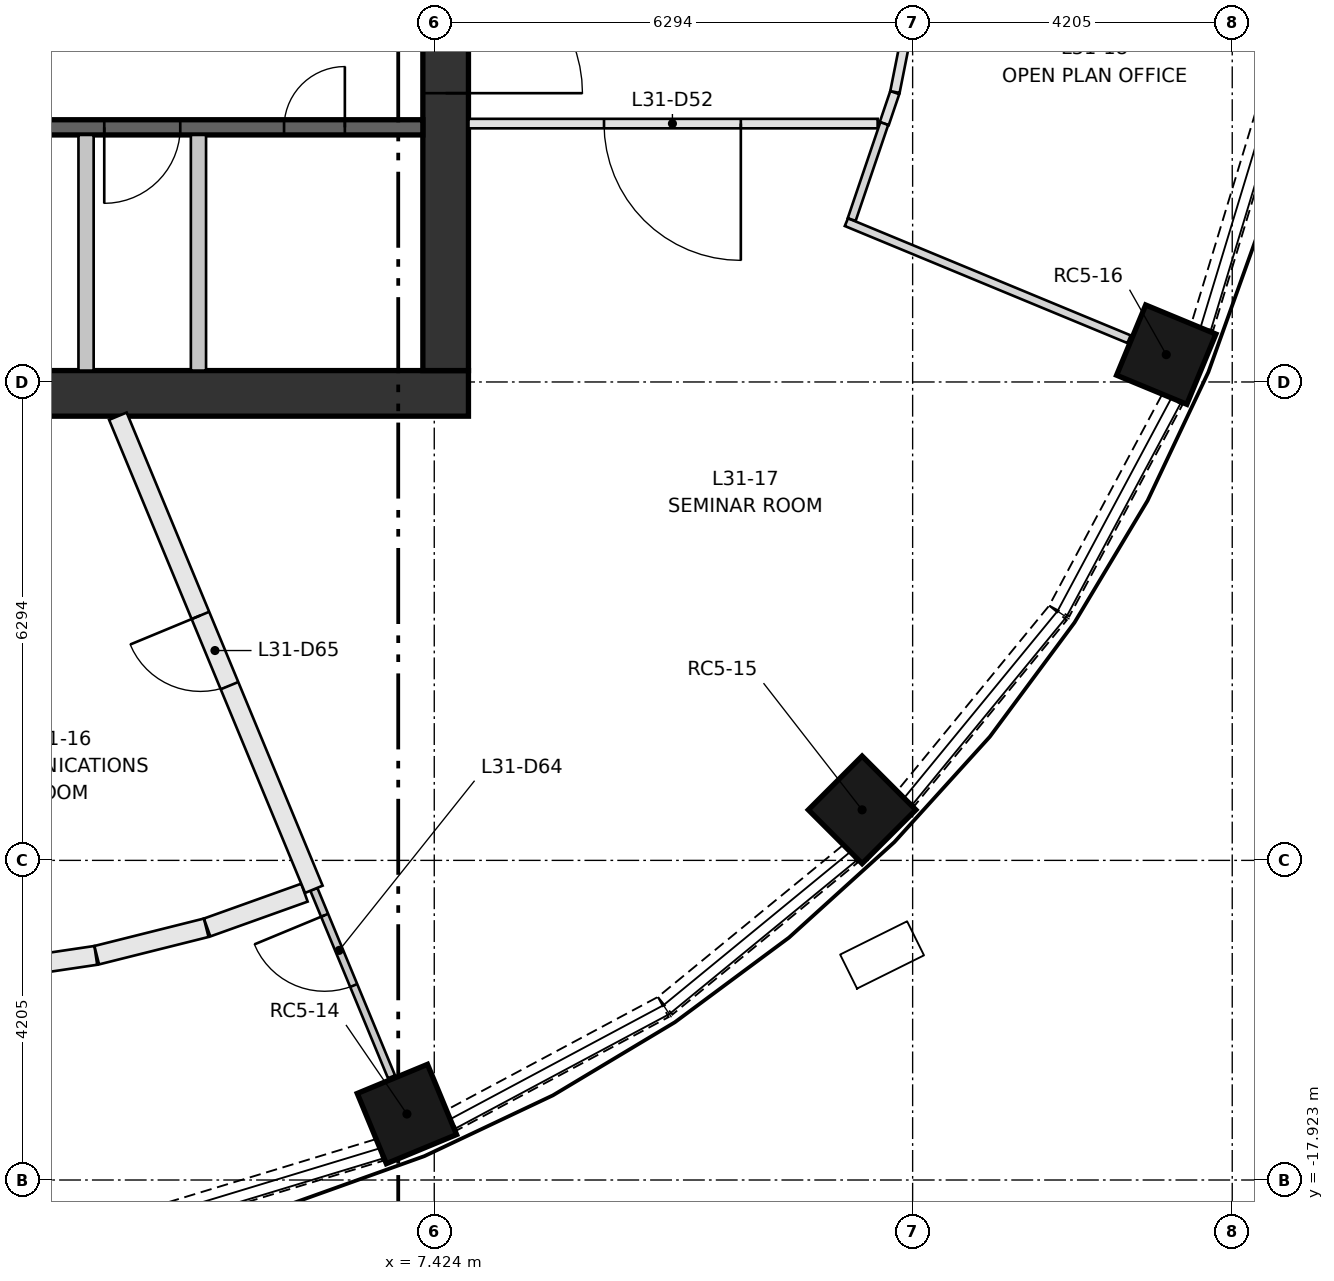
"""IFC4 building model, lengths in metres.
Left out: names, types, materials, properties, quantities, classifications, styles, units other than length and angle.
Written with IfcOpenShell. Run it as: python <this file> out.ifc"""

import sys

from ifc_helpers import new_model, si_unit, direction, frame, frame_2d, origin, origin_2d, place, context, subcontext, project, spatial, rectangle, extrude, element, fill, save


model = new_model("IFC4")
c1 = context("Model", 3, precision=1e-05, world=origin(), true_north=direction((0.0, 1.0)))
c2 = subcontext(c1, "Body", "Model", "MODEL_VIEW")
j1 = project(units=[si_unit("LENGTHUNIT", "METRE"), si_unit("PLANEANGLEUNIT", "RADIAN")], contexts=[c1])
p1 = place(None, origin())
s1 = spatial("IfcSite", under=j1, at=p1, CompositionType="ELEMENT")
p2 = place(p1, origin())
s2 = spatial("IfcBuilding", under=s1, at=p2, CompositionType="ELEMENT")
p3 = place(p2, frame((0.0, 0.0, 120.95)))
s3 = spatial("IfcBuildingStorey", under=s2, at=p3, CompositionType="ELEMENT", Elevation=120.95)
for number, where, z_axis, x_axis in (
    (1, (7.064, -17.055, 0.0), (0.0, 0.0, 1.0), (0.383, -0.924, 0.0)),
    (2, (13.053, -13.053, 0.0), (0.0, 0.0, 1.0), (0.707, -0.707, 0.0)),
    (3, (17.055, -7.064, 0.0), (0.0, 0.0, 1.0), (0.924, -0.383, 0.0)),
):
    element("IfcColumn", number, at=place(p3, frame(where, z_axis=z_axis, x_axis=x_axis)), inside=s3, PredefinedType="COLUMN", context=c2, shape_type="SweptSolid", body=[
        extrude(rectangle(XDim=1.0, YDim=1.0, at=origin_2d()), origin(), (0.0, 0.0, 1.0), 3.35),
    ])
p4 = place(p3, frame((-7.874, -7.574, 0.0), z_axis=(0.0, 0.0, 1.0), x_axis=(1.0, 0.0, 0.0)))
e4 = element("IfcWall", 4, at=p4, inside=s3, PredefinedType="SHEAR", context=c2, shape_type="SweptSolid", body=[
    extrude(rectangle(XDim=15.748, YDim=0.6, at=frame_2d((7.874, 0.0))), origin(), (0.0, 0.0, 1.0), 3.35),
])
p5 = place(p3, frame((7.574, -7.274, 0.0), z_axis=(0.0, 0.0, 1.0), x_axis=(0.0, 1.0, 0.0)))
e5 = element("IfcWall", 5, at=p5, inside=s3, PredefinedType="SHEAR", context=c2, shape_type="SweptSolid", body=[
    extrude(rectangle(XDim=14.548, YDim=0.6, at=frame_2d((7.274, 0.0))), origin(), (0.0, 0.0, 1.0), 3.35),
])
p6 = place(p5, frame((6.774, 0.0, 0.0)))
e6 = element("IfcOpeningElement", 6, at=p6, cuts=e5, PredefinedType="OPENING", context=c2, shape_type="SweptSolid", body=[
    extrude(rectangle(XDim=1.0, YDim=2.1, at=frame_2d((0.5, 1.05))), frame((0.0, 0.31, 0.0), z_axis=(0.0, -1.0, 0.0), x_axis=(1.0, 0.0, 0.0)), (0.0, 0.0, 1.0), 0.62),
])
p7 = place(p5, frame((3.649, 0.0, 0.0)))
e7 = element("IfcOpeningElement", 7, at=p7, cuts=e5, PredefinedType="OPENING", context=c2, shape_type="SweptSolid", body=[
    extrude(rectangle(XDim=1.8, YDim=2.1, at=frame_2d((0.9, 1.05))), frame((0.0, 0.31, 0.0), z_axis=(0.0, -1.0, 0.0), x_axis=(1.0, 0.0, 0.0)), (0.0, 0.0, 1.0), 0.62),
])
p8 = place(p5, frame((9.098, 0.0, 0.0)))
e8 = element("IfcOpeningElement", 8, at=p8, cuts=e5, PredefinedType="OPENING", context=c2, shape_type="SweptSolid", body=[
    extrude(rectangle(XDim=1.8, YDim=2.1, at=frame_2d((0.9, 1.05))), frame((0.0, 0.31, 0.0), z_axis=(0.0, -1.0, 0.0), x_axis=(1.0, 0.0, 0.0)), (0.0, 0.0, 1.0), 0.62),
])
p9 = place(p3, frame((-7.274, -4.074, 0.0), z_axis=(0.0, 0.0, 1.0), x_axis=(1.0, 0.0, 0.0)))
e9 = element("IfcWall", 9, at=p9, inside=s3, PredefinedType="SHEAR", context=c2, shape_type="SweptSolid", body=[
    extrude(rectangle(XDim=14.548, YDim=0.2, at=frame_2d((7.274, 0.0))), origin(), (0.0, 0.0, 1.0), 3.0),
])
p10 = place(p9, frame((1.219, 0.0, 0.0)))
e10 = element("IfcOpeningElement", 10, at=p10, cuts=e9, PredefinedType="OPENING", context=c2, shape_type="SweptSolid", body=[
    extrude(rectangle(XDim=1.1, YDim=2.1, at=frame_2d((0.55, 1.05))), frame((0.0, 0.11, 0.0), z_axis=(0.0, -1.0, 0.0), x_axis=(1.0, 0.0, 0.0)), (0.0, 0.0, 1.0), 0.22),
])
p11 = place(p9, frame((4.355, 0.0, 0.0)))
e11 = element("IfcOpeningElement", 11, at=p11, cuts=e9, PredefinedType="OPENING", context=c2, shape_type="SweptSolid", body=[
    extrude(rectangle(XDim=1.1, YDim=2.1, at=frame_2d((0.55, 1.05))), frame((0.0, 0.11, 0.0), z_axis=(0.0, -1.0, 0.0), x_axis=(1.0, 0.0, 0.0)), (0.0, 0.0, 1.0), 0.22),
])
p12 = place(p9, frame((7.795, 0.0, 0.0)))
e12 = element("IfcOpeningElement", 12, at=p12, cuts=e9, PredefinedType="OPENING", context=c2, shape_type="SweptSolid", body=[
    extrude(rectangle(XDim=1.0, YDim=2.1, at=frame_2d((0.5, 1.05))), frame((0.0, 0.11, 0.0), z_axis=(0.0, -1.0, 0.0), x_axis=(1.0, 0.0, 0.0)), (0.0, 0.0, 1.0), 0.22),
])
p13 = place(p9, frame((10.356, 0.0, 0.0)))
e13 = element("IfcOpeningElement", 13, at=p13, cuts=e9, PredefinedType="OPENING", context=c2, shape_type="SweptSolid", body=[
    extrude(rectangle(XDim=1.0, YDim=2.1, at=frame_2d((0.5, 1.05))), frame((0.0, 0.11, 0.0), z_axis=(0.0, -1.0, 0.0), x_axis=(1.0, 0.0, 0.0)), (0.0, 0.0, 1.0), 0.22),
])
p14 = place(p9, frame((12.722, 0.0, 0.0)))
e14 = element("IfcOpeningElement", 14, at=p14, cuts=e9, PredefinedType="OPENING", context=c2, shape_type="SweptSolid", body=[
    extrude(rectangle(XDim=0.8, YDim=2.1, at=frame_2d((0.4, 1.05))), frame((0.0, 0.11, 0.0), z_axis=(0.0, -1.0, 0.0), x_axis=(1.0, 0.0, 0.0)), (0.0, 0.0, 1.0), 0.22),
])
for number, where, z_axis, x_axis in (
    (15, (2.843, -7.274, 0.0), (0.0, 0.0, 1.0), (0.0, 1.0, 0.0)),
    (16, (4.322, -7.274, 0.0), (0.0, 0.0, 1.0), (0.0, 1.0, 0.0)),
):
    element("IfcWall", number, at=place(p3, frame(where, z_axis=z_axis, x_axis=x_axis)), inside=s3, PredefinedType="PARTITIONING", context=c2, shape_type="SweptSolid", body=[
        extrude(rectangle(XDim=3.1, YDim=0.2, at=frame_2d((1.55, 0.0))), origin(), (0.0, 0.0, 1.0), 3.0),
    ])
p15 = place(p3, frame((3.683, -18.445, 0.0), z_axis=(0.0, 0.0, 1.0), x_axis=(0.956874051907, 0.290503096001, 0.0)))
e17 = element("IfcWall", 17, at=p15, inside=s3, PredefinedType="SOLIDWALL", context=c2, shape_type="SweptSolid", body=[
    extrude(rectangle(XDim=3.157, YDim=0.3, at=frame_2d((1.579, 0.0))), origin(), (0.0, 0.0, 1.0), 0.9),
])
p16 = place(p3, frame((7.654, -17.135, 0.0), z_axis=(0.0, 0.0, 1.0), x_axis=(0.881851238747, 0.471527722113, 0.0)))
e18 = element("IfcWall", 18, at=p16, inside=s3, PredefinedType="SOLIDWALL", context=c2, shape_type="SweptSolid", body=[
    extrude(rectangle(XDim=3.155, YDim=0.3, at=frame_2d((1.578, 0.0))), origin(), (0.0, 0.0, 1.0), 0.9),
])
for number, where, z_axis, x_axis in (
    (19, (10.462, -15.631, 0.0), (0.0, 0.0, 1.0), (0.773, 0.634, 0.0)),
    (20, (13.628, -12.902, 0.0), (0.0, 0.0, 1.0), (0.634, 0.773, 0.0)),
):
    element("IfcWall", number, at=place(p3, frame(where, z_axis=z_axis, x_axis=x_axis)), inside=s3, PredefinedType="SOLIDWALL", context=c2, shape_type="SweptSolid", body=[
        extrude(rectangle(XDim=3.157, YDim=0.3, at=frame_2d((1.578, 0.0))), origin(), (0.0, 0.0, 1.0), 0.9),
    ])
p17 = place(p3, frame((15.647, -10.437, 0.0), z_axis=(0.0, 0.0, 1.0), x_axis=(0.471527722113, 0.881851238747, 0.0)))
e21 = element("IfcWall", 21, at=p17, inside=s3, PredefinedType="SOLIDWALL", context=c2, shape_type="SweptSolid", body=[
    extrude(rectangle(XDim=3.155, YDim=0.3, at=frame_2d((1.578, 0.0))), origin(), (0.0, 0.0, 1.0), 0.9),
])
p18 = place(p3, frame((17.527, -6.705, 0.0), z_axis=(0.0, 0.0, 1.0), x_axis=(0.290503096001, 0.956874051907, 0.0)))
e22 = element("IfcWall", 22, at=p18, inside=s3, PredefinedType="SOLIDWALL", context=c2, shape_type="SweptSolid", body=[
    extrude(rectangle(XDim=3.157, YDim=0.3, at=frame_2d((1.579, 0.0))), origin(), (0.0, 0.0, 1.0), 0.9),
])
p19 = place(p3, frame((13.258, -4.024, 0.0), z_axis=(0.0, 0.0, 1.0), x_axis=(-1.0, 0.0, 0.0)))
e23 = element("IfcWall", 23, at=p19, inside=s3, PredefinedType="PARTITIONING", context=c2, shape_type="SweptSolid", body=[
    extrude(rectangle(XDim=5.384, YDim=0.125, at=frame_2d((2.692, 0.0))), origin(), (0.0, 0.0, 1.0), 3.0),
])
p20 = place(p19, frame((1.8, 0.0, 0.0)))
e24 = element("IfcOpeningElement", 24, at=p20, cuts=e23, PredefinedType="OPENING", context=c2, shape_type="SweptSolid", body=[
    extrude(rectangle(XDim=1.8, YDim=2.1, at=frame_2d((0.9, 1.05))), frame((0.0, 0.073, 0.0), z_axis=(0.0, -1.0, 0.0), x_axis=(1.0, 0.0, 0.0)), (0.0, 0.0, 1.0), 0.145),
])
p21 = place(p3, frame((13.483, -3.617, 0.0), z_axis=(0.0, 0.0, 1.0), x_axis=(-0.321160043658, -0.947024934391, 0.0)))
e25 = element("IfcWall", 25, at=p21, inside=s3, PredefinedType="PARTITIONING", context=c2, shape_type="SweptSolid", body=[
    extrude(rectangle(XDim=0.43, YDim=0.125, at=frame_2d((0.215, 0.0))), origin(), (0.0, 0.0, 1.0), 3.0),
])
p22 = place(p3, frame((13.84, -1.826, 0.0), z_axis=(0.0, 0.0, 1.0), x_axis=(-0.195134630283, -0.980776465901, 0.0)))
e26 = element("IfcWall", 26, at=p22, inside=s3, PredefinedType="PARTITIONING", context=c2, shape_type="SweptSolid", body=[
    extrude(rectangle(XDim=1.818, YDim=0.125, at=frame_2d((0.909, 0.0))), origin(), (0.0, 0.0, 1.0), 3.0),
])
p23 = place(p3, frame((1.502, -15.186, 0.0), z_axis=(0.0, 0.0, 1.0), x_axis=(0.989192869337, 0.146620146136, 0.0)))
e27 = element("IfcWall", 27, at=p23, inside=s3, PredefinedType="PARTITIONING", context=c2, shape_type="SweptSolid", body=[
    extrude(rectangle(XDim=1.485, YDim=0.25, at=frame_2d((0.743, 0.0))), origin(), (0.0, 0.0, 1.0), 3.0),
])
p24 = place(p3, frame((2.983, -14.965, 0.0), z_axis=(0.0, 0.0, 1.0), x_axis=(0.970026334084, 0.24299981725, 0.0)))
e28 = element("IfcWall", 28, at=p24, inside=s3, PredefinedType="PARTITIONING", context=c2, shape_type="SweptSolid", body=[
    extrude(rectangle(XDim=1.485, YDim=0.25, at=frame_2d((0.742, 0.0))), origin(), (0.0, 0.0, 1.0), 3.0),
])
p25 = place(p3, frame((4.436, -14.601, 0.0), z_axis=(0.0, 0.0, 1.0), x_axis=(0.941526469986, 0.336939024626, 0.0)))
e29 = element("IfcWall", 29, at=p25, inside=s3, PredefinedType="PARTITIONING", context=c2, shape_type="SweptSolid", body=[
    extrude(rectangle(XDim=1.36, YDim=0.25, at=frame_2d((0.68, 0.0))), origin(), (0.0, 0.0, 1.0), 3.0),
])
p26 = place(p3, frame((6.862, -16.565, 0.0), z_axis=(0.0, 0.0, 1.0), x_axis=(-0.382744787218, 0.923854116112, 0.0)))
e30 = element("IfcWall", 30, at=p26, inside=s3, PredefinedType="PARTITIONING", context=c2, shape_type="SweptSolid", body=[
    extrude(rectangle(XDim=2.67, YDim=0.1, at=frame_2d((1.335, 0.0))), origin(), (0.0, 0.0, 1.0), 3.0),
])
p27 = place(p26, frame((1.3, 0.0, 0.0)))
e31 = element("IfcOpeningElement", 31, at=p27, cuts=e30, PredefinedType="OPENING", context=c2, shape_type="SweptSolid", body=[
    extrude(rectangle(XDim=1.0, YDim=2.1, at=frame_2d((0.5, 1.05))), frame((0.0, 0.06, 0.0), z_axis=(0.0, -1.0, 0.0), x_axis=(1.0, 0.0, 0.0)), (0.0, 0.0, 1.0), 0.12),
])
p28 = place(p3, frame((5.84, -14.098, 0.0), z_axis=(0.0, 0.0, 1.0), x_axis=(-0.382671840259, 0.923884334034, 0.0)))
e32 = element("IfcWall", 32, at=p28, inside=s3, PredefinedType="PARTITIONING", context=c2, shape_type="SweptSolid", body=[
    extrude(rectangle(XDim=6.737, YDim=0.25, at=frame_2d((3.369, 0.0))), origin(), (0.0, 0.0, 1.0), 3.0),
])
p29 = place(p28, frame((2.9, 0.0, 0.0)))
e33 = element("IfcOpeningElement", 33, at=p29, cuts=e32, PredefinedType="OPENING", context=c2, shape_type="SweptSolid", body=[
    extrude(rectangle(XDim=1.0, YDim=2.1, at=frame_2d((0.5, 1.05))), frame((0.0, 0.135, 0.0), z_axis=(0.0, -1.0, 0.0), x_axis=(1.0, 0.0, 0.0)), (0.0, 0.0, 1.0), 0.27),
])
p30 = place(p3, frame((12.847, -5.321, 0.0), z_axis=(0.0, 0.0, 1.0), x_axis=(0.923877104161, -0.382689294869, 0.0)))
e34 = element("IfcWall", 34, at=p30, inside=s3, PredefinedType="PARTITIONING", context=c2, shape_type="SweptSolid", body=[
    extrude(rectangle(XDim=4.025, YDim=0.11, at=frame_2d((2.012, 0.0))), origin(), (0.0, 0.0, 1.0), 3.0),
])
p31 = place(p3, frame((13.345, -4.024, 0.0), z_axis=(0.0, 0.0, 1.0), x_axis=(-0.32144299332, -0.946928931888, 0.0)))
e35 = element("IfcWall", 35, at=p31, inside=s3, PredefinedType="PARTITIONING", context=c2, shape_type="SweptSolid", body=[
    extrude(rectangle(XDim=1.333, YDim=0.11, at=frame_2d((0.667, 0.0))), origin(), (0.0, 0.0, 1.0), 3.0),
])
p32 = place(p13, frame((1.0, 0.0, 0.0), z_axis=(0.0, 0.0, 1.0), x_axis=(-1.0, 0.0, 0.0)))
e36 = element("IfcDoor", 36, at=p32, inside=s3, OperationType="SINGLE_SWING_LEFT", PredefinedType="DOOR", context=c2, shape_type="SweptSolid", body=[
    extrude(rectangle(XDim=1.0, YDim=2.1, at=frame_2d((0.5, 1.05))), frame((0.0, 0.025, 0.0), z_axis=(0.0, -1.0, 0.0), x_axis=(1.0, 0.0, 0.0)), (0.0, 0.0, 1.0), 0.05),
])
fill(e13, e36)
p33 = place(p14, origin())
e37 = element("IfcDoor", 37, at=p33, inside=s3, OperationType="SINGLE_SWING_RIGHT", PredefinedType="DOOR", context=c2, shape_type="SweptSolid", body=[
    extrude(rectangle(XDim=0.8, YDim=2.1, at=frame_2d((0.4, 1.05))), frame((0.0, 0.025, 0.0), z_axis=(0.0, -1.0, 0.0), x_axis=(1.0, 0.0, 0.0)), (0.0, 0.0, 1.0), 0.05),
])
fill(e14, e37)
p34 = place(p7, frame((1.8, 0.0, 0.0), z_axis=(0.0, 0.0, 1.0), x_axis=(-1.0, 0.0, 0.0)))
e38 = element("IfcDoor", 38, at=p34, inside=s3, OperationType="DOUBLE_DOOR_SINGLE_SWING", PredefinedType="DOOR", context=c2, shape_type="SweptSolid", body=[
    extrude(rectangle(XDim=1.8, YDim=2.1, at=frame_2d((0.9, 1.05))), frame((0.0, 0.025, 0.0), z_axis=(0.0, -1.0, 0.0), x_axis=(1.0, 0.0, 0.0)), (0.0, 0.0, 1.0), 0.05),
])
fill(e7, e38)
p35 = place(p20, origin())
e39 = element("IfcDoor", 39, at=p35, inside=s3, OperationType="DOUBLE_DOOR_SINGLE_SWING", PredefinedType="DOOR", context=c2, shape_type="SweptSolid", body=[
    extrude(rectangle(XDim=1.8, YDim=2.1, at=frame_2d((0.9, 1.05))), frame((0.0, 0.025, 0.0), z_axis=(0.0, -1.0, 0.0), x_axis=(1.0, 0.0, 0.0)), (0.0, 0.0, 1.0), 0.05),
])
fill(e24, e39)
p36 = place(p27, origin())
e40 = element("IfcDoor", 40, at=p36, inside=s3, OperationType="SINGLE_SWING_RIGHT", PredefinedType="DOOR", context=c2, shape_type="SweptSolid", body=[
    extrude(rectangle(XDim=1.0, YDim=2.1, at=frame_2d((0.5, 1.05))), frame((0.0, 0.025, 0.0), z_axis=(0.0, -1.0, 0.0), x_axis=(1.0, 0.0, 0.0)), (0.0, 0.0, 1.0), 0.05),
])
fill(e31, e40)
p37 = place(p29, origin())
e41 = element("IfcDoor", 41, at=p37, inside=s3, OperationType="SINGLE_SWING_RIGHT", PredefinedType="DOOR", context=c2, shape_type="SweptSolid", body=[
    extrude(rectangle(XDim=1.0, YDim=2.1, at=frame_2d((0.5, 1.05))), frame((0.0, 0.025, 0.0), z_axis=(0.0, -1.0, 0.0), x_axis=(1.0, 0.0, 0.0)), (0.0, 0.0, 1.0), 0.05),
])
fill(e33, e41)
save(model, sys.argv[1])
